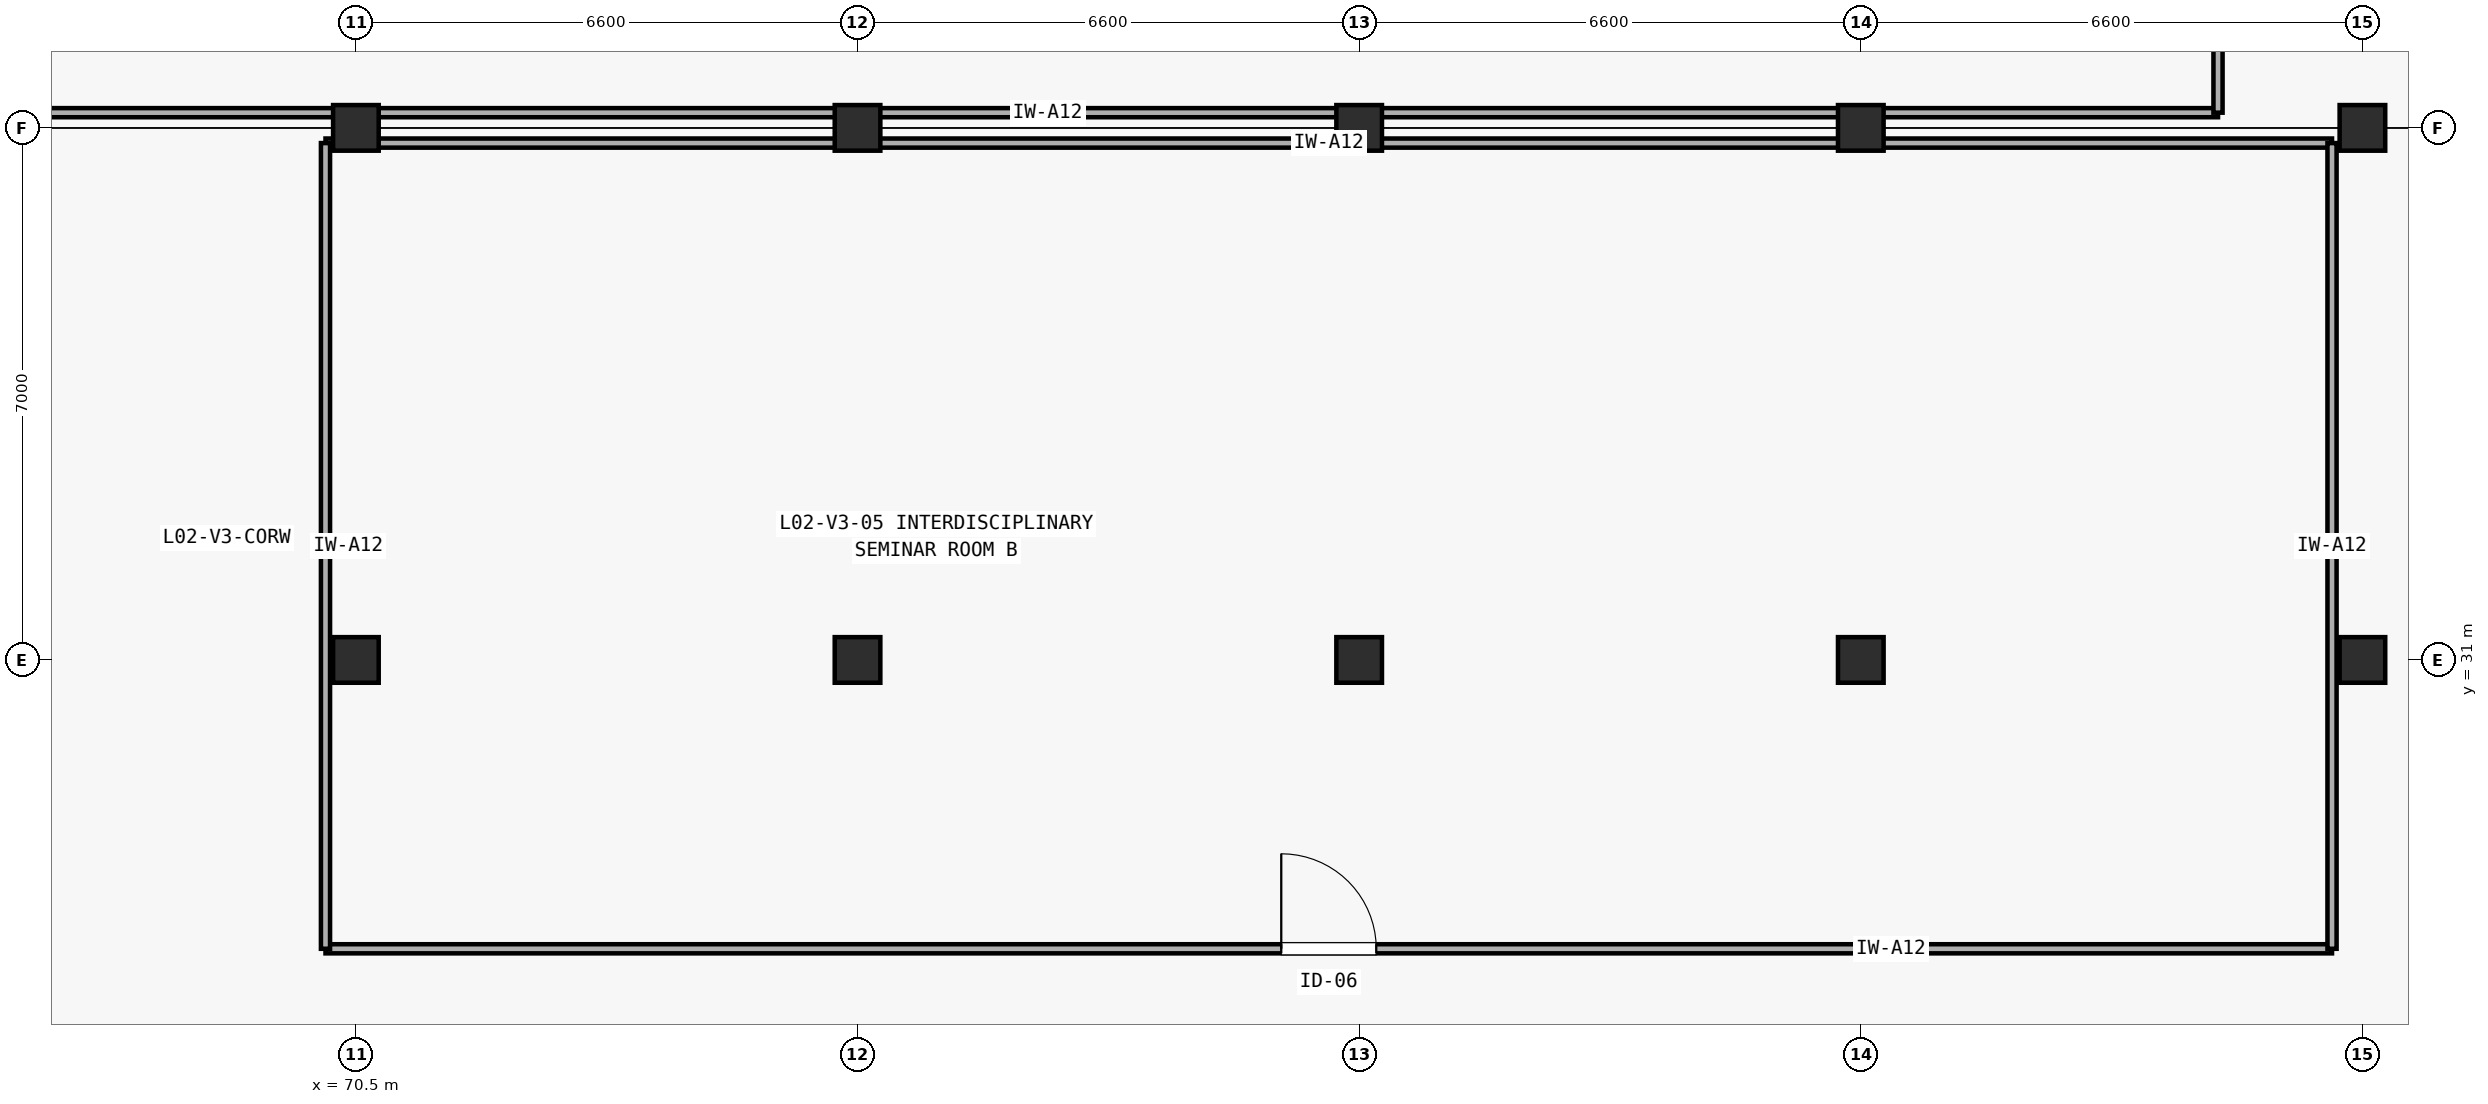
"""IFC4 building model, lengths in metres.
Left out: names, types, materials, properties, quantities, classifications, styles, units other than length and angle.
Written with IfcOpenShell. Run it as: python <this file> out.ifc"""

import sys

from ifc_helpers import new_model, si_unit, direction, frame, frame_2d, origin, origin_2d, place, context, subcontext, project, spatial, rectangle, extrude, element, fill, save


model = new_model("IFC4")
c1 = context("Model", 3, precision=1e-05, world=origin(), true_north=direction((0.0, 1.0)))
c2 = subcontext(c1, "Body", "Model", "MODEL_VIEW")
j1 = project(units=[si_unit("LENGTHUNIT", "METRE"), si_unit("PLANEANGLEUNIT", "RADIAN")], contexts=[c1])
p1 = place(None, origin())
s1 = spatial("IfcSite", under=j1, at=p1, CompositionType="ELEMENT")
p2 = place(p1, origin())
s2 = spatial("IfcBuilding", under=s1, at=p2, CompositionType="ELEMENT")
p3 = place(p2, frame((0.0, 0.0, 8.4)))
s3 = spatial("IfcBuildingStorey", under=s2, at=p3, CompositionType="ELEMENT", Elevation=8.4)
for number, where, z_axis, x_axis in (
    (1, (70.5, 31.0, 0.0), (0.0, 0.0, 1.0), (1.0, 0.0, 0.0)),
    (2, (70.5, 38.0, 0.0), (0.0, 0.0, 1.0), (1.0, 0.0, 0.0)),
    (3, (77.1, 31.0, 0.0), (0.0, 0.0, 1.0), (1.0, 0.0, 0.0)),
    (4, (77.1, 38.0, 0.0), (0.0, 0.0, 1.0), (1.0, 0.0, 0.0)),
    (5, (83.7, 31.0, 0.0), (0.0, 0.0, 1.0), (1.0, 0.0, 0.0)),
    (6, (83.7, 38.0, 0.0), (0.0, 0.0, 1.0), (1.0, 0.0, 0.0)),
    (7, (90.3, 31.0, 0.0), (0.0, 0.0, 1.0), (1.0, 0.0, 0.0)),
    (8, (90.3, 38.0, 0.0), (0.0, 0.0, 1.0), (1.0, 0.0, 0.0)),
    (9, (96.9, 31.0, 0.0), (0.0, 0.0, 1.0), (1.0, 0.0, 0.0)),
    (10, (96.9, 38.0, 0.0), (0.0, 0.0, 1.0), (1.0, 0.0, 0.0)),
):
    element("IfcColumn", number, at=place(p3, frame(where, z_axis=z_axis, x_axis=x_axis)), inside=s3, PredefinedType="COLUMN", context=c2, shape_type="SweptSolid", body=[
        extrude(rectangle(XDim=0.6, YDim=0.6, at=origin_2d()), origin(), (0.0, 0.0, 1.0), 4.2),
    ])
p4 = place(p3, frame((70.1, 27.2, 0.0), z_axis=(0.0, 0.0, 1.0), x_axis=(1.0, 0.0, 0.0)))
e11 = element("IfcWall", 11, at=p4, inside=s3, PredefinedType="PARTITIONING", context=c2, shape_type="SweptSolid", body=[
    extrude(rectangle(XDim=26.4, YDim=0.12, at=frame_2d((13.2, 0.0))), origin(), (0.0, 0.0, 1.0), 3.9),
])
p5 = place(p4, frame((12.575, 0.0, 0.0)))
e12 = element("IfcOpeningElement", 12, at=p5, cuts=e11, PredefinedType="OPENING", context=c2, shape_type="SweptSolid", body=[
    extrude(rectangle(XDim=1.25, YDim=2.15, at=frame_2d((0.625, 1.075))), frame((0.0, 0.07, 0.0), z_axis=(0.0, -1.0, 0.0), x_axis=(1.0, 0.0, 0.0)), (0.0, 0.0, 1.0), 0.14),
])
p6 = place(p3, frame((70.1, 37.8, 0.0), z_axis=(0.0, 0.0, 1.0), x_axis=(1.0, 0.0, 0.0)))
e13 = element("IfcWall", 13, at=p6, inside=s3, PredefinedType="PARTITIONING", context=c2, shape_type="SweptSolid", body=[
    extrude(rectangle(XDim=26.4, YDim=0.12, at=frame_2d((13.2, 0.0))), origin(), (0.0, 0.0, 1.0), 3.235),
])
for number, where, z_axis, x_axis in (
    (14, (70.1, 27.2, 0.0), (0.0, 0.0, 1.0), (0.0, 1.0, 0.0)),
    (15, (96.5, 27.2, 0.0), (0.0, 0.0, 1.0), (0.0, 1.0, 0.0)),
):
    element("IfcWall", number, at=place(p3, frame(where, z_axis=z_axis, x_axis=x_axis)), inside=s3, PredefinedType="PARTITIONING", context=c2, shape_type="SweptSolid", body=[
        extrude(rectangle(XDim=10.6, YDim=0.12, at=frame_2d((5.3, 0.0))), origin(), (0.0, 0.0, 1.0), 3.9),
    ])
p7 = place(p3, frame((64.2, 38.2, 0.0), z_axis=(0.0, 0.0, 1.0), x_axis=(1.0, 0.0, 0.0)))
e16 = element("IfcWall", 16, at=p7, inside=s3, PredefinedType="PARTITIONING", context=c2, shape_type="SweptSolid", body=[
    extrude(rectangle(XDim=30.8, YDim=0.12, at=frame_2d((15.4, 0.0))), origin(), (0.0, 0.0, 1.0), 3.235),
])
p8 = place(p3, frame((95.0, 38.2, 0.0), z_axis=(0.0, 0.0, 1.0), x_axis=(0.0, 1.0, 0.0)))
e17 = element("IfcWall", 17, at=p8, inside=s3, PredefinedType="PARTITIONING", context=c2, shape_type="SweptSolid", body=[
    extrude(rectangle(XDim=11.1, YDim=0.12, at=frame_2d((5.55, 0.0))), origin(), (0.0, 0.0, 1.0), 3.9),
])
p9 = place(p5, origin())
e18 = element("IfcDoor", 18, at=p9, inside=s3, OperationType="SINGLE_SWING_LEFT", PredefinedType="DOOR", context=c2, shape_type="SweptSolid", body=[
    extrude(rectangle(XDim=1.25, YDim=2.15, at=frame_2d((0.625, 1.075))), frame((0.0, 0.025, 0.0), z_axis=(0.0, -1.0, 0.0), x_axis=(1.0, 0.0, 0.0)), (0.0, 0.0, 1.0), 0.05),
])
fill(e12, e18)
save(model, sys.argv[1])
